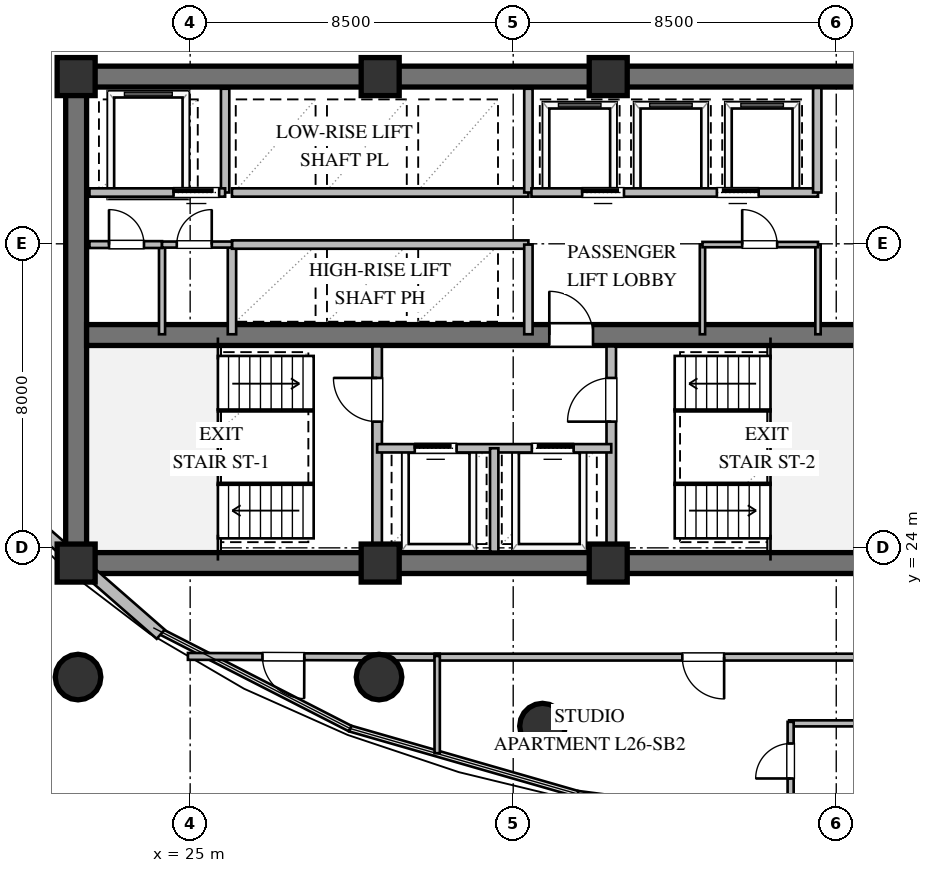
"""IFC4 building model, lengths in metres.
Left out: names, types, materials, properties, quantities, classifications, styles, units other than length and angle.
Written with IfcOpenShell. Run it as: python <this file> out.ifc"""

import sys

from ifc_helpers import new_model, si_unit, direction, frame, frame_2d, origin, origin_2d, place, context, subcontext, project, spatial, rectangle, circle, extrude, element, fill, save


model = new_model("IFC4")
c1 = context("Model", 3, precision=1e-05, world=origin(), true_north=direction((0.0, 1.0)))
c2 = subcontext(c1, "Body", "Model", "MODEL_VIEW")
j1 = project(units=[si_unit("LENGTHUNIT", "METRE"), si_unit("PLANEANGLEUNIT", "RADIAN")], contexts=[c1])
p1 = place(None, origin())
s1 = spatial("IfcSite", under=j1, at=p1, CompositionType="ELEMENT")
p2 = place(p1, origin())
s2 = spatial("IfcBuilding", under=s1, at=p2, CompositionType="ELEMENT")
p3 = place(p2, frame((0.0, 0.0, 102.6)))
s3 = spatial("IfcBuildingStorey", under=s2, at=p3, CompositionType="ELEMENT", Elevation=102.6)
for number, where, z_axis, x_axis in (
    (1, (21.725, 23.6, 0.0), (0.0, 0.0, 1.0), (1.0, 0.0, 0.0)),
    (2, (21.725, 36.4, 0.0), (0.0, 0.0, 1.0), (1.0, 0.0, 0.0)),
):
    element("IfcWall", number, at=place(p3, frame(where, z_axis=z_axis, x_axis=x_axis)), inside=s3, PredefinedType="SHEAR", context=c2, shape_type="SweptSolid", body=[
        extrude(rectangle(XDim=22.55, YDim=0.55, at=frame_2d((11.275, 0.0))), origin(), (0.0, 0.0, 1.0), 3.36),
    ])
p4 = place(p3, frame((22.0, 23.875, 0.0), z_axis=(0.0, 0.0, 1.0), x_axis=(0.0, 1.0, 0.0)))
e3 = element("IfcWall", 3, at=p4, inside=s3, PredefinedType="SHEAR", context=c2, shape_type="SweptSolid", body=[
    extrude(rectangle(XDim=12.25, YDim=0.55, at=frame_2d((6.125, 0.0))), origin(), (0.0, 0.0, 1.0), 3.36),
])
p5 = place(p3, frame((22.275, 29.6, 0.0), z_axis=(0.0, 0.0, 1.0), x_axis=(1.0, 0.0, 0.0)))
e4 = element("IfcWall", 4, at=p5, inside=s3, PredefinedType="SHEAR", context=c2, shape_type="SweptSolid", body=[
    extrude(rectangle(XDim=21.45, YDim=0.55, at=frame_2d((10.725, 0.0))), origin(), (0.0, 0.0, 1.0), 3.36),
])
p6 = place(p5, frame((12.175, 0.0, 0.0)))
e5 = element("IfcOpeningElement", 5, at=p6, cuts=e4, PredefinedType="OPENING", context=c2, shape_type="SweptSolid", body=[
    extrude(rectangle(XDim=1.15, YDim=2.1, at=frame_2d((0.575, 1.05))), frame((0.0, 0.285, 0.0), z_axis=(0.0, -1.0, 0.0), x_axis=(1.0, 0.0, 0.0)), (0.0, 0.0, 1.0), 0.57),
])
for number, where, z_axis, x_axis in (
    (6, (22.0, 23.6, 0.0), (0.0, 0.0, 1.0), (1.0, 0.0, 0.0)),
    (7, (30.0, 23.6, 0.0), (0.0, 0.0, 1.0), (1.0, 0.0, 0.0)),
    (8, (36.0, 23.6, 0.0), (0.0, 0.0, 1.0), (1.0, 0.0, 0.0)),
    (9, (36.0, 36.4, 0.0), (0.0, 0.0, 1.0), (1.0, 0.0, 0.0)),
    (10, (30.0, 36.4, 0.0), (0.0, 0.0, 1.0), (1.0, 0.0, 0.0)),
    (11, (22.0, 36.4, 0.0), (0.0, 0.0, 1.0), (1.0, 0.0, 0.0)),
):
    element("IfcColumn", number, at=place(p3, frame(where, z_axis=z_axis, x_axis=x_axis)), inside=s3, PredefinedType="COLUMN", context=c2, shape_type="SweptSolid", body=[
        extrude(rectangle(XDim=1.0, YDim=1.0, at=origin_2d()), origin(), (0.0, 0.0, 1.0), 3.6),
    ])
for number, where, z_axis, x_axis in (
    (12, (22.05, 20.6, 0.0), (0.0, 0.0, 1.0), (1.0, 0.0, 0.0)),
    (13, (29.97, 20.6, 0.0), (0.0, 0.0, 1.0), (1.0, 0.0, 0.0)),
    (14, (34.27, 19.31, 0.0), (0.0, 0.0, 1.0), (1.0, 0.0, 0.0)),
):
    element("IfcColumn", number, at=place(p3, frame(where, z_axis=z_axis, x_axis=x_axis)), inside=s3, PredefinedType="COLUMN", context=c2, shape_type="SweptSolid", body=[
        extrude(circle(Radius=0.6, at=origin_2d()), origin(), (0.0, 0.0, 1.0), 3.6),
    ])
p7 = place(p3, frame((24.225, 21.727, 0.0), z_axis=(0.0, 0.0, 1.0), x_axis=(-0.753105964003, 0.657899237713, 0.0)))
e15 = element("IfcWall", 15, at=p7, inside=s3, PredefinedType="STANDARD", context=c2, shape_type="SweptSolid", body=[
    extrude(rectangle(XDim=5.998, YDim=0.32, at=frame_2d((2.999, 0.0))), origin(), (0.0, 0.0, 1.0), 2.35),
])
p8 = place(p3, frame((29.92, 23.9, 0.0), z_axis=(0.0, 0.0, 1.0), x_axis=(0.0, 1.0, 0.0)))
e16 = element("IfcWall", 16, at=p8, inside=s3, PredefinedType="SOLIDWALL", context=c2, shape_type="SweptSolid", body=[
    extrude(rectangle(XDim=5.4, YDim=0.25, at=frame_2d((2.7, 0.0))), origin(), (0.0, 0.0, 1.0), 2.806),
])
p9 = place(p8, frame((3.421, 0.0, 0.0)))
e17 = element("IfcOpeningElement", 17, at=p9, cuts=e16, PredefinedType="OPENING", context=c2, shape_type="SweptSolid", body=[
    extrude(rectangle(XDim=1.15, YDim=2.1, at=frame_2d((0.575, 1.05))), frame((0.0, 0.135, 0.0), z_axis=(0.0, -1.0, 0.0), x_axis=(1.0, 0.0, 0.0)), (0.0, 0.0, 1.0), 0.27),
])
p10 = place(p3, frame((36.08, 23.9, 0.0), z_axis=(0.0, 0.0, 1.0), x_axis=(0.0, 1.0, 0.0)))
e18 = element("IfcWall", 18, at=p10, inside=s3, PredefinedType="SOLIDWALL", context=c2, shape_type="SweptSolid", body=[
    extrude(rectangle(XDim=5.4, YDim=0.25, at=frame_2d((2.7, 0.0))), origin(), (0.0, 0.0, 1.0), 3.36),
])
p11 = place(p10, frame((3.421, 0.0, 0.0)))
e19 = element("IfcOpeningElement", 19, at=p11, cuts=e18, PredefinedType="OPENING", context=c2, shape_type="SweptSolid", body=[
    extrude(rectangle(XDim=1.15, YDim=2.1, at=frame_2d((0.575, 1.05))), frame((0.0, 0.135, 0.0), z_axis=(0.0, -1.0, 0.0), x_axis=(1.0, 0.0, 0.0)), (0.0, 0.0, 1.0), 0.27),
])
p12 = place(p3, frame((29.92, 26.62, 0.0), z_axis=(0.0, 0.0, 1.0), x_axis=(1.0, 0.0, 0.0)))
e20 = element("IfcWall", 20, at=p12, inside=s3, PredefinedType="SOLIDWALL", context=c2, shape_type="SweptSolid", body=[
    extrude(rectangle(XDim=6.16, YDim=0.22, at=frame_2d((3.08, 0.0))), origin(), (0.0, 0.0, 1.0), 3.36),
])
p13 = place(p12, frame((0.99, 0.0, 0.0)))
e21 = element("IfcOpeningElement", 21, at=p13, cuts=e20, PredefinedType="OPENING", context=c2, shape_type="SweptSolid", body=[
    extrude(rectangle(XDim=1.1, YDim=2.1, at=frame_2d((0.55, 1.05))), frame((0.0, 0.12, 0.0), z_axis=(0.0, -1.0, 0.0), x_axis=(1.0, 0.0, 0.0)), (0.0, 0.0, 1.0), 0.24),
])
p14 = place(p12, frame((4.07, 0.0, 0.0)))
e22 = element("IfcOpeningElement", 22, at=p14, cuts=e20, PredefinedType="OPENING", context=c2, shape_type="SweptSolid", body=[
    extrude(rectangle(XDim=1.1, YDim=2.1, at=frame_2d((0.55, 1.05))), frame((0.0, 0.12, 0.0), z_axis=(0.0, -1.0, 0.0), x_axis=(1.0, 0.0, 0.0)), (0.0, 0.0, 1.0), 0.24),
])
p15 = place(p3, frame((33.0, 23.9, 0.0), z_axis=(0.0, 0.0, 1.0), x_axis=(0.0, 1.0, 0.0)))
e23 = element("IfcWall", 23, at=p15, inside=s3, PredefinedType="SOLIDWALL", context=c2, shape_type="SweptSolid", body=[
    extrude(rectangle(XDim=2.72, YDim=0.22, at=frame_2d((1.36, 0.0))), origin(), (0.0, 0.0, 1.0), 3.36),
])
p16 = place(p3, frame((25.92, 33.35, 0.0), z_axis=(0.0, 0.0, 1.0), x_axis=(0.0, 1.0, 0.0)))
e24 = element("IfcWall", 24, at=p16, inside=s3, PredefinedType="SOLIDWALL", context=c2, shape_type="SweptSolid", body=[
    extrude(rectangle(XDim=2.73, YDim=0.22, at=frame_2d((1.365, 0.0))), origin(), (0.0, 0.0, 1.0), 3.36),
])
p17 = place(p3, frame((22.35, 33.35, 0.0), z_axis=(0.0, 0.0, 1.0), x_axis=(1.0, 0.0, 0.0)))
e25 = element("IfcWall", 25, at=p17, inside=s3, PredefinedType="SOLIDWALL", context=c2, shape_type="SweptSolid", body=[
    extrude(rectangle(XDim=3.57, YDim=0.22, at=frame_2d((1.785, 0.0))), origin(), (0.0, 0.0, 1.0), 3.36),
])
p18 = place(p17, frame((2.213, 0.0, 0.0)))
e26 = element("IfcOpeningElement", 26, at=p18, cuts=e25, PredefinedType="OPENING", context=c2, shape_type="SweptSolid", body=[
    extrude(rectangle(XDim=1.2, YDim=2.1, at=frame_2d((0.6, 1.05))), frame((0.0, 0.12, 0.0), z_axis=(0.0, -1.0, 0.0), x_axis=(1.0, 0.0, 0.0)), (0.0, 0.0, 1.0), 0.24),
])
p19 = place(p3, frame((26.1, 29.62, 0.0), z_axis=(0.0, 0.0, 1.0), x_axis=(0.0, 1.0, 0.0)))
e27 = element("IfcWall", 27, at=p19, inside=s3, PredefinedType="SOLIDWALL", context=c2, shape_type="SweptSolid", body=[
    extrude(rectangle(XDim=2.36, YDim=0.22, at=frame_2d((1.18, 0.0))), origin(), (0.0, 0.0, 1.0), 3.36),
])
p20 = place(p3, frame((26.1, 31.98, 0.0), z_axis=(0.0, 0.0, 1.0), x_axis=(1.0, 0.0, 0.0)))
e28 = element("IfcWall", 28, at=p20, inside=s3, PredefinedType="SOLIDWALL", context=c2, shape_type="SweptSolid", body=[
    extrude(rectangle(XDim=7.8, YDim=0.22, at=frame_2d((3.9, 0.0))), origin(), (0.0, 0.0, 1.0), 3.36),
])
p21 = place(p3, frame((33.9, 29.62, 0.0), z_axis=(0.0, 0.0, 1.0), x_axis=(0.0, 1.0, 0.0)))
e29 = element("IfcWall", 29, at=p21, inside=s3, PredefinedType="SOLIDWALL", context=c2, shape_type="SweptSolid", body=[
    extrude(rectangle(XDim=2.36, YDim=0.22, at=frame_2d((1.18, 0.0))), origin(), (0.0, 0.0, 1.0), 3.36),
])
p22 = place(p3, frame((26.1, 33.35, 0.0), z_axis=(0.0, 0.0, 1.0), x_axis=(1.0, 0.0, 0.0)))
e30 = element("IfcWall", 30, at=p22, inside=s3, PredefinedType="SOLIDWALL", context=c2, shape_type="SweptSolid", body=[
    extrude(rectangle(XDim=7.8, YDim=0.22, at=frame_2d((3.9, 0.0))), origin(), (0.0, 0.0, 1.0), 3.36),
])
p23 = place(p3, frame((33.9, 33.35, 0.0), z_axis=(0.0, 0.0, 1.0), x_axis=(0.0, 1.0, 0.0)))
e31 = element("IfcWall", 31, at=p23, inside=s3, PredefinedType="SOLIDWALL", context=c2, shape_type="SweptSolid", body=[
    extrude(rectangle(XDim=2.73, YDim=0.22, at=frame_2d((1.365, 0.0))), origin(), (0.0, 0.0, 1.0), 3.36),
])
p24 = place(p3, frame((33.98, 33.35, 0.0), z_axis=(0.0, 0.0, 1.0), x_axis=(1.0, 0.0, 0.0)))
e32 = element("IfcWall", 32, at=p24, inside=s3, PredefinedType="SOLIDWALL", context=c2, shape_type="SweptSolid", body=[
    extrude(rectangle(XDim=7.54, YDim=0.22, at=frame_2d((3.77, 0.0))), origin(), (0.0, 0.0, 1.0), 3.36),
])
p25 = place(p24, frame((1.335, 0.0, 0.0)))
e33 = element("IfcOpeningElement", 33, at=p25, cuts=e32, PredefinedType="OPENING", context=c2, shape_type="SweptSolid", body=[
    extrude(rectangle(XDim=1.1, YDim=2.1, at=frame_2d((0.55, 1.05))), frame((0.0, 0.12, 0.0), z_axis=(0.0, -1.0, 0.0), x_axis=(1.0, 0.0, 0.0)), (0.0, 0.0, 1.0), 0.24),
])
p26 = place(p24, frame((4.879, 0.0, 0.0)))
e34 = element("IfcOpeningElement", 34, at=p26, cuts=e32, PredefinedType="OPENING", context=c2, shape_type="SweptSolid", body=[
    extrude(rectangle(XDim=1.1, YDim=2.1, at=frame_2d((0.55, 1.05))), frame((0.0, 0.12, 0.0), z_axis=(0.0, -1.0, 0.0), x_axis=(1.0, 0.0, 0.0)), (0.0, 0.0, 1.0), 0.24),
])
p27 = place(p3, frame((41.5, 33.35, 0.0), z_axis=(0.0, 0.0, 1.0), x_axis=(0.0, 1.0, 0.0)))
e35 = element("IfcWall", 35, at=p27, inside=s3, PredefinedType="SOLIDWALL", context=c2, shape_type="SweptSolid", body=[
    extrude(rectangle(XDim=2.75, YDim=0.22, at=frame_2d((1.375, 0.0))), origin(), (0.0, 0.0, 1.0), 3.36),
])
p28 = place(p3, frame((24.26, 29.62, 0.0), z_axis=(0.0, 0.0, 1.0), x_axis=(0.0, 1.0, 0.0)))
e36 = element("IfcWall", 36, at=p28, inside=s3, PredefinedType="PLUMBINGWALL", context=c2, shape_type="SweptSolid", body=[
    extrude(rectangle(XDim=2.36, YDim=0.16, at=frame_2d((1.18, 0.0))), origin(), (0.0, 0.0, 1.0), 3.36),
])
p29 = place(p3, frame((22.35, 31.98, 0.0), z_axis=(0.0, 0.0, 1.0), x_axis=(1.0, 0.0, 0.0)))
e37 = element("IfcWall", 37, at=p29, inside=s3, PredefinedType="PARTITIONING", context=c2, shape_type="SweptSolid", body=[
    extrude(rectangle(XDim=1.91, YDim=0.18, at=frame_2d((0.955, 0.0))), origin(), (0.0, 0.0, 1.0), 3.36),
])
p30 = place(p29, frame((0.515, 0.0, 0.0)))
e38 = element("IfcOpeningElement", 38, at=p30, cuts=e37, PredefinedType="OPENING", context=c2, shape_type="SweptSolid", body=[
    extrude(rectangle(XDim=0.92, YDim=2.1, at=frame_2d((0.46, 1.05))), frame((0.0, 0.1, 0.0), z_axis=(0.0, -1.0, 0.0), x_axis=(1.0, 0.0, 0.0)), (0.0, 0.0, 1.0), 0.2),
])
p31 = place(p3, frame((24.26, 31.98, 0.0), z_axis=(0.0, 0.0, 1.0), x_axis=(1.0, 0.0, 0.0)))
e39 = element("IfcWall", 39, at=p31, inside=s3, PredefinedType="PLUMBINGWALL", context=c2, shape_type="SweptSolid", body=[
    extrude(rectangle(XDim=1.84, YDim=0.16, at=frame_2d((0.92, 0.0))), origin(), (0.0, 0.0, 1.0), 3.36),
])
p32 = place(p31, frame((0.388, 0.0, 0.0)))
e40 = element("IfcOpeningElement", 40, at=p32, cuts=e39, PredefinedType="OPENING", context=c2, shape_type="SweptSolid", body=[
    extrude(rectangle(XDim=0.92, YDim=2.1, at=frame_2d((0.46, 1.05))), frame((0.0, 0.09, 0.0), z_axis=(0.0, -1.0, 0.0), x_axis=(1.0, 0.0, 0.0)), (0.0, 0.0, 1.0), 0.18),
])
for number, where, z_axis, x_axis in (
    (41, (38.48, 29.62, 0.0), (0.0, 0.0, 1.0), (0.0, 1.0, 0.0)),
    (42, (41.52, 29.62, 0.0), (0.0, 0.0, 1.0), (0.0, 1.0, 0.0)),
):
    element("IfcWall", number, at=place(p3, frame(where, z_axis=z_axis, x_axis=x_axis)), inside=s3, PredefinedType="PARTITIONING", context=c2, shape_type="SweptSolid", body=[
        extrude(rectangle(XDim=2.36, YDim=0.14, at=frame_2d((1.18, 0.0))), origin(), (0.0, 0.0, 1.0), 3.36),
    ])
p33 = place(p3, frame((38.48, 31.98, 0.0), z_axis=(0.0, 0.0, 1.0), x_axis=(1.0, 0.0, 0.0)))
e43 = element("IfcWall", 43, at=p33, inside=s3, PredefinedType="PARTITIONING", context=c2, shape_type="SweptSolid", body=[
    extrude(rectangle(XDim=3.04, YDim=0.14, at=frame_2d((1.52, 0.0))), origin(), (0.0, 0.0, 1.0), 3.36),
])
p34 = place(p33, frame((1.045, 0.0, 0.0)))
e44 = element("IfcOpeningElement", 44, at=p34, cuts=e43, PredefinedType="OPENING", context=c2, shape_type="SweptSolid", body=[
    extrude(rectangle(XDim=0.92, YDim=2.1, at=frame_2d((0.46, 1.05))), frame((0.0, 0.08, 0.0), z_axis=(0.0, -1.0, 0.0), x_axis=(1.0, 0.0, 0.0)), (0.0, 0.0, 1.0), 0.16),
])
p35 = place(p3, frame((40.76, 19.382, 0.0), z_axis=(0.0, 0.0, 1.0), x_axis=(1.0, 0.0, 0.0)))
e45 = element("IfcWall", 45, at=p35, inside=s3, PredefinedType="PLUMBINGWALL", context=c2, shape_type="SweptSolid", body=[
    extrude(rectangle(XDim=2.08, YDim=0.16, at=frame_2d((1.04, 0.0))), origin(), (0.0, 0.0, 1.0), 3.36),
])
p36 = place(p3, frame((40.8, 17.342, 0.0), z_axis=(0.0, 0.0, 1.0), x_axis=(0.0, 1.0, 0.0)))
e46 = element("IfcWall", 46, at=p36, inside=s3, PredefinedType="PLUMBINGWALL", context=c2, shape_type="SweptSolid", body=[
    extrude(rectangle(XDim=2.08, YDim=0.16, at=frame_2d((1.04, 0.0))), origin(), (0.0, 0.0, 1.0), 3.36),
])
p37 = place(p36, frame((0.59, 0.0, 0.0)))
e47 = element("IfcOpeningElement", 47, at=p37, cuts=e46, PredefinedType="OPENING", context=c2, shape_type="SweptSolid", body=[
    extrude(rectangle(XDim=0.92, YDim=2.1, at=frame_2d((0.46, 1.05))), frame((0.0, 0.09, 0.0), z_axis=(0.0, -1.0, 0.0), x_axis=(1.0, 0.0, 0.0)), (0.0, 0.0, 1.0), 0.18),
])
p38 = place(p3, frame((31.565, 21.125, 0.0), z_axis=(0.0, 0.0, 1.0), x_axis=(-0.99999586769, 0.002874822264, 0.0)))
e48 = element("IfcWall", 48, at=p38, inside=s3, PredefinedType="PARTITIONING", context=c2, shape_type="SweptSolid", body=[
    extrude(rectangle(XDim=6.624, YDim=0.18, at=frame_2d((3.312, 0.0))), origin(), (0.0, 0.0, 1.0), 2.657),
])
p39 = place(p38, frame((3.562, 0.0, 0.0)))
e49 = element("IfcOpeningElement", 49, at=p39, cuts=e48, PredefinedType="OPENING", context=c2, shape_type="SweptSolid", body=[
    extrude(rectangle(XDim=1.1, YDim=2.1, at=frame_2d((0.55, 1.05))), frame((0.0, 0.1, 0.0), z_axis=(0.0, -1.0, 0.0), x_axis=(1.0, 0.0, 0.0)), (0.0, 0.0, 1.0), 0.2),
])
p40 = place(p3, frame((45.565, 21.125, 0.0), z_axis=(0.0, 0.0, 1.0), x_axis=(-1.0, 0.0, 0.0)))
e50 = element("IfcWall", 50, at=p40, inside=s3, PredefinedType="PARTITIONING", context=c2, shape_type="SweptSolid", body=[
    extrude(rectangle(XDim=14.13, YDim=0.18, at=frame_2d((7.065, 0.0))), origin(), (0.0, 0.0, 1.0), 2.996),
])
p41 = place(p40, frame((6.515, 0.0, 0.0)))
e51 = element("IfcOpeningElement", 51, at=p41, cuts=e50, PredefinedType="OPENING", context=c2, shape_type="SweptSolid", body=[
    extrude(rectangle(XDim=1.1, YDim=2.1, at=frame_2d((0.55, 1.05))), frame((0.0, 0.1, 0.0), z_axis=(0.0, -1.0, 0.0), x_axis=(1.0, 0.0, 0.0)), (0.0, 0.0, 1.0), 0.2),
])
p42 = place(p3, frame((31.5, 21.155, 0.0), z_axis=(0.0, 0.0, 1.0), x_axis=(0.0, -1.0, 0.0)))
e52 = element("IfcWall", 52, at=p42, inside=s3, PredefinedType="PARTITIONING", context=c2, shape_type="SweptSolid", body=[
    extrude(rectangle(XDim=2.558, YDim=0.14, at=frame_2d((1.279, 0.0))), origin(), (0.0, 0.0, 1.0), 3.36),
])
p43 = place(p9, origin())
e53 = element("IfcDoor", 53, at=p43, inside=s3, OperationType="SINGLE_SWING_RIGHT", PredefinedType="DOOR", context=c2, shape_type="SweptSolid", body=[
    extrude(rectangle(XDim=1.15, YDim=2.1, at=frame_2d((0.575, 1.05))), frame((0.0, 0.025, 0.0), z_axis=(0.0, -1.0, 0.0), x_axis=(1.0, 0.0, 0.0)), (0.0, 0.0, 1.0), 0.05),
])
fill(e17, e53)
p44 = place(p11, origin())
e54 = element("IfcDoor", 54, at=p44, inside=s3, OperationType="SINGLE_SWING_LEFT", PredefinedType="DOOR", context=c2, shape_type="SweptSolid", body=[
    extrude(rectangle(XDim=1.15, YDim=2.1, at=frame_2d((0.575, 1.05))), frame((0.0, 0.025, 0.0), z_axis=(0.0, -1.0, 0.0), x_axis=(1.0, 0.0, 0.0)), (0.0, 0.0, 1.0), 0.05),
])
fill(e19, e54)
p45 = place(p13, origin())
e55 = element("IfcDoor", 55, at=p45, inside=s3, OperationType="SLIDING_TO_LEFT", PredefinedType="DOOR", context=c2, shape_type="SweptSolid", body=[
    extrude(rectangle(XDim=1.1, YDim=2.1, at=frame_2d((0.55, 1.05))), frame((0.0, 0.025, 0.0), z_axis=(0.0, -1.0, 0.0), x_axis=(1.0, 0.0, 0.0)), (0.0, 0.0, 1.0), 0.05),
])
fill(e21, e55)
p46 = place(p14, origin())
e56 = element("IfcDoor", 56, at=p46, inside=s3, OperationType="SLIDING_TO_RIGHT", PredefinedType="DOOR", context=c2, shape_type="SweptSolid", body=[
    extrude(rectangle(XDim=1.1, YDim=2.1, at=frame_2d((0.55, 1.05))), frame((0.0, 0.025, 0.0), z_axis=(0.0, -1.0, 0.0), x_axis=(1.0, 0.0, 0.0)), (0.0, 0.0, 1.0), 0.05),
])
fill(e22, e56)
p47 = place(p6, origin())
e57 = element("IfcDoor", 57, at=p47, inside=s3, OperationType="SINGLE_SWING_LEFT", PredefinedType="DOOR", context=c2, shape_type="SweptSolid", body=[
    extrude(rectangle(XDim=1.15, YDim=2.1, at=frame_2d((0.575, 1.05))), frame((0.0, 0.025, 0.0), z_axis=(0.0, -1.0, 0.0), x_axis=(1.0, 0.0, 0.0)), (0.0, 0.0, 1.0), 0.05),
])
fill(e5, e57)
p48 = place(p18, origin())
e58 = element("IfcDoor", 58, at=p48, inside=s3, OperationType="SLIDING_TO_LEFT", PredefinedType="DOOR", context=c2, shape_type="SweptSolid", body=[
    extrude(rectangle(XDim=1.2, YDim=2.1, at=frame_2d((0.6, 1.05))), frame((0.0, 0.025, 0.0), z_axis=(0.0, -1.0, 0.0), x_axis=(1.0, 0.0, 0.0)), (0.0, 0.0, 1.0), 0.05),
])
fill(e26, e58)
p49 = place(p25, origin())
e59 = element("IfcDoor", 59, at=p49, inside=s3, OperationType="SLIDING_TO_LEFT", PredefinedType="DOOR", context=c2, shape_type="SweptSolid", body=[
    extrude(rectangle(XDim=1.1, YDim=2.1, at=frame_2d((0.55, 1.05))), frame((0.0, 0.025, 0.0), z_axis=(0.0, -1.0, 0.0), x_axis=(1.0, 0.0, 0.0)), (0.0, 0.0, 1.0), 0.05),
])
fill(e33, e59)
p50 = place(p26, origin())
e60 = element("IfcDoor", 60, at=p50, inside=s3, OperationType="SLIDING_TO_RIGHT", PredefinedType="DOOR", context=c2, shape_type="SweptSolid", body=[
    extrude(rectangle(XDim=1.1, YDim=2.1, at=frame_2d((0.55, 1.05))), frame((0.0, 0.025, 0.0), z_axis=(0.0, -1.0, 0.0), x_axis=(1.0, 0.0, 0.0)), (0.0, 0.0, 1.0), 0.05),
])
fill(e34, e60)
p51 = place(p30, origin())
e61 = element("IfcDoor", 61, at=p51, inside=s3, OperationType="SINGLE_SWING_LEFT", PredefinedType="DOOR", context=c2, shape_type="SweptSolid", body=[
    extrude(rectangle(XDim=0.92, YDim=2.1, at=frame_2d((0.46, 1.05))), frame((0.0, 0.025, 0.0), z_axis=(0.0, -1.0, 0.0), x_axis=(1.0, 0.0, 0.0)), (0.0, 0.0, 1.0), 0.05),
])
fill(e38, e61)
p52 = place(p32, origin())
e62 = element("IfcDoor", 62, at=p52, inside=s3, OperationType="SINGLE_SWING_RIGHT", PredefinedType="DOOR", context=c2, shape_type="SweptSolid", body=[
    extrude(rectangle(XDim=0.92, YDim=2.1, at=frame_2d((0.46, 1.05))), frame((0.0, 0.025, 0.0), z_axis=(0.0, -1.0, 0.0), x_axis=(1.0, 0.0, 0.0)), (0.0, 0.0, 1.0), 0.05),
])
fill(e40, e62)
p53 = place(p34, origin())
e63 = element("IfcDoor", 63, at=p53, inside=s3, OperationType="SINGLE_SWING_LEFT", PredefinedType="DOOR", context=c2, shape_type="SweptSolid", body=[
    extrude(rectangle(XDim=0.92, YDim=2.1, at=frame_2d((0.46, 1.05))), frame((0.0, 0.025, 0.0), z_axis=(0.0, -1.0, 0.0), x_axis=(1.0, 0.0, 0.0)), (0.0, 0.0, 1.0), 0.05),
])
fill(e44, e63)
p54 = place(p37, origin())
e64 = element("IfcDoor", 64, at=p54, inside=s3, OperationType="SINGLE_SWING_LEFT", PredefinedType="DOOR", context=c2, shape_type="SweptSolid", body=[
    extrude(rectangle(XDim=0.92, YDim=2.1, at=frame_2d((0.46, 1.05))), frame((0.0, 0.025, 0.0), z_axis=(0.0, -1.0, 0.0), x_axis=(1.0, 0.0, 0.0)), (0.0, 0.0, 1.0), 0.05),
])
fill(e47, e64)
p55 = place(p39, origin())
e65 = element("IfcDoor", 65, at=p55, inside=s3, OperationType="SINGLE_SWING_LEFT", PredefinedType="DOOR", context=c2, shape_type="SweptSolid", body=[
    extrude(rectangle(XDim=1.1, YDim=2.1, at=frame_2d((0.55, 1.05))), frame((0.0, 0.025, 0.0), z_axis=(0.0, -1.0, 0.0), x_axis=(1.0, 0.0, 0.0)), (0.0, 0.0, 1.0), 0.05),
])
fill(e49, e65)
p56 = place(p41, origin())
e66 = element("IfcDoor", 66, at=p56, inside=s3, OperationType="SINGLE_SWING_LEFT", PredefinedType="DOOR", context=c2, shape_type="SweptSolid", body=[
    extrude(rectangle(XDim=1.1, YDim=2.1, at=frame_2d((0.55, 1.05))), frame((0.0, 0.025, 0.0), z_axis=(0.0, -1.0, 0.0), x_axis=(1.0, 0.0, 0.0)), (0.0, 0.0, 1.0), 0.05),
])
fill(e51, e66)
save(model, sys.argv[1])
